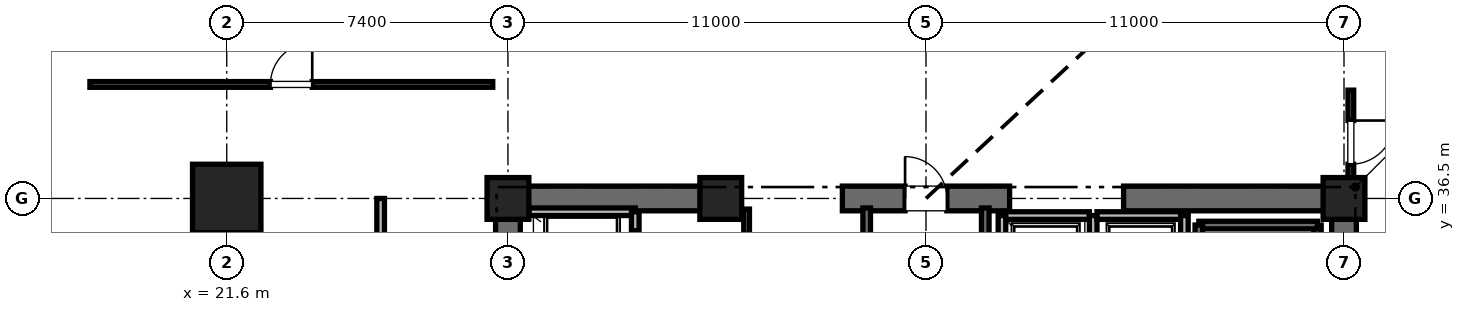
"""IFC4 building model, lengths in metres.
Left out: names, types, materials, properties, quantities, classifications, styles, units other than length and angle.
Written with IfcOpenShell. Run it as: python <this file> out.ifc"""

import sys

from ifc_helpers import new_model, si_unit, direction, frame, frame_2d, origin, origin_2d, place, context, subcontext, project, spatial, rectangle, extrude, element, fill, save


model = new_model("IFC4")
c1 = context("Model", 3, precision=1e-05, world=origin(), true_north=direction((0.0, 1.0)))
c2 = subcontext(c1, "Body", "Model", "MODEL_VIEW")
j1 = project(units=[si_unit("LENGTHUNIT", "METRE"), si_unit("PLANEANGLEUNIT", "RADIAN")], contexts=[c1])
p1 = place(None, origin())
s1 = spatial("IfcSite", under=j1, at=p1, CompositionType="ELEMENT")
p2 = place(p1, origin())
s2 = spatial("IfcBuilding", under=s1, at=p2, CompositionType="ELEMENT")
p3 = place(p2, origin())
s3 = spatial("IfcBuildingStorey", under=s2, at=p3, CompositionType="ELEMENT", Elevation=0.0)
p4 = place(p3, frame((21.6, 36.5, 0.0), z_axis=(0.0, 0.0, 1.0), x_axis=(1.0, 0.0, 0.0)))
e1 = element("IfcColumn", 1, at=p4, inside=s3, PredefinedType="COLUMN", context=c2, shape_type="SweptSolid", body=[
    extrude(rectangle(XDim=1.8, YDim=1.8, at=origin_2d()), origin(), (0.0, 0.0, 1.0), 6.0),
])
for number, where, z_axis, x_axis in (
    (2, (29.0, 36.5, 0.0), (0.0, 0.0, 1.0), (1.0, 0.0, 0.0)),
    (3, (51.0, 36.5, 0.0), (0.0, 0.0, 1.0), (1.0, 0.0, 0.0)),
    (4, (34.6, 36.5, 0.0), (0.0, 0.0, 1.0), (1.0, 0.0, 0.0)),
):
    element("IfcColumn", number, at=place(p3, frame(where, z_axis=z_axis, x_axis=x_axis)), inside=s3, PredefinedType="PILASTER", context=c2, shape_type="SweptSolid", body=[
        extrude(rectangle(XDim=1.1, YDim=1.1, at=origin_2d()), origin(), (0.0, 0.0, 1.0), 6.0),
    ])
p5 = place(p3, frame((29.0, 36.5, 0.0), z_axis=(0.0, 0.0, 1.0), x_axis=(1.0, 0.0, 0.0)))
e5 = element("IfcWall", 5, at=p5, inside=s3, PredefinedType="SHEAR", context=c2, shape_type="SweptSolid", body=[
    extrude(rectangle(XDim=5.8, YDim=0.65, at=frame_2d((2.9, 0.0))), origin(), (0.0, 0.0, 1.0), 5.72),
])
p6 = place(p3, frame((37.8, 36.5, 0.0), z_axis=(0.0, 0.0, 1.0), x_axis=(1.0, 0.0, 0.0)))
e6 = element("IfcWall", 6, at=p6, inside=s3, PredefinedType="SHEAR", context=c2, shape_type="SweptSolid", body=[
    extrude(rectangle(XDim=4.4, YDim=0.65, at=frame_2d((2.2, 0.0))), origin(), (0.0, 0.0, 1.0), 5.72),
])
p7 = place(p6, frame((1.65, 0.0, 0.0)))
e7 = element("IfcOpeningElement", 7, at=p7, cuts=e6, PredefinedType="OPENING", context=c2, shape_type="SweptSolid", body=[
    extrude(rectangle(XDim=1.1, YDim=2.15, at=frame_2d((0.55, 1.075))), frame((0.0, 0.325, 0.0), z_axis=(0.0, -1.0, 0.0), x_axis=(1.0, 0.0, 0.0)), (0.0, 0.0, 1.0), 0.65),
])
for number, where, z_axis, x_axis in (
    (8, (45.2, 36.5, 0.0), (0.0, 0.0, 1.0), (1.0, 0.0, 0.0)),
    (9, (29.0, 30.7, 0.0), (0.0, 0.0, 1.0), (0.0, 1.0, 0.0)),
):
    element("IfcWall", number, at=place(p3, frame(where, z_axis=z_axis, x_axis=x_axis)), inside=s3, PredefinedType="SHEAR", context=c2, shape_type="SweptSolid", body=[
        extrude(rectangle(XDim=5.8, YDim=0.65, at=frame_2d((2.9, 0.0))), origin(), (0.0, 0.0, 1.0), 5.72),
    ])
p8 = place(p3, frame((51.0, 27.7, 0.0), z_axis=(0.0, 0.0, 1.0), x_axis=(0.0, 1.0, 0.0)))
e10 = element("IfcWall", 10, at=p8, inside=s3, PredefinedType="SHEAR", context=c2, shape_type="SweptSolid", body=[
    extrude(rectangle(XDim=8.8, YDim=0.65, at=frame_2d((4.4, 0.0))), origin(), (0.0, 0.0, 1.0), 5.72),
])
p9 = place(p3, frame((50.3, 27.65, 0.0), z_axis=(0.0, 0.0, 1.0), x_axis=(0.0, 1.0, 0.0)))
e11 = element("IfcWall", 11, at=p9, inside=s3, PredefinedType="SOLIDWALL", context=c2, shape_type="SweptSolid", body=[
    extrude(rectangle(XDim=8.15, YDim=0.2, at=frame_2d((4.075, 0.0))), origin(), (0.0, 0.0, 1.0), 5.72),
])
p10 = place(p3, frame((47.18, 35.8, 0.0), z_axis=(0.0, 0.0, 1.0), x_axis=(1.0, 0.0, 0.0)))
e12 = element("IfcWall", 12, at=p10, inside=s3, PredefinedType="SOLIDWALL", context=c2, shape_type="SweptSolid", body=[
    extrude(rectangle(XDim=3.12, YDim=0.2, at=frame_2d((1.56, 0.0))), origin(), (0.0, 0.0, 1.0), 5.72),
])
p11 = place(p3, frame((47.18, 27.62, 0.0), z_axis=(0.0, 0.0, 1.0), x_axis=(0.0, 1.0, 0.0)))
e13 = element("IfcWall", 13, at=p11, inside=s3, PredefinedType="SOLIDWALL", context=c2, shape_type="SweptSolid", body=[
    extrude(rectangle(XDim=8.18, YDim=0.2, at=frame_2d((4.09, 0.0))), origin(), (0.0, 0.0, 1.0), 5.72),
])
p12 = place(p3, frame((38.44, 27.38, 0.0), z_axis=(0.0, 0.0, 1.0), x_axis=(0.0, 1.0, 0.0)))
e14 = element("IfcWall", 14, at=p12, inside=s3, PredefinedType="SOLIDWALL", context=c2, shape_type="SweptSolid", body=[
    extrude(rectangle(XDim=8.87, YDim=0.2, at=frame_2d((4.435, 0.0))), origin(), (0.0, 0.0, 1.0), 5.72),
])
p13 = place(p3, frame((41.56, 27.68, 0.0), z_axis=(0.0, 0.0, 1.0), x_axis=(0.0, 1.0, 0.0)))
e15 = element("IfcWall", 15, at=p13, inside=s3, PredefinedType="SOLIDWALL", context=c2, shape_type="SweptSolid", body=[
    extrude(rectangle(XDim=8.57, YDim=0.2, at=frame_2d((4.285, 0.0))), origin(), (0.0, 0.0, 1.0), 5.72),
])
p14 = place(p3, frame((32.35, 36.15, 0.0), z_axis=(0.0, 0.0, 1.0), x_axis=(-1.0, 0.0, 0.0)))
e16 = element("IfcWall", 16, at=p14, inside=s3, PredefinedType="SOLIDWALL", context=c2, shape_type="SweptSolid", body=[
    extrude(rectangle(XDim=2.8, YDim=0.2, at=frame_2d((1.4, 0.0))), origin(), (0.0, 0.0, 1.0), 4.779),
])
p15 = place(p3, frame((32.35, 34.05, 0.0), z_axis=(0.0, 0.0, 1.0), x_axis=(0.0, 1.0, 0.0)))
e17 = element("IfcWall", 17, at=p15, inside=s3, PredefinedType="SOLIDWALL", context=c2, shape_type="SweptSolid", body=[
    extrude(rectangle(XDim=2.1, YDim=0.2, at=frame_2d((1.05, 0.0))), origin(), (0.0, 0.0, 1.0), 5.72),
])
p16 = place(p15, frame((0.5, 0.0, 0.0)))
e18 = element("IfcOpeningElement", 18, at=p16, cuts=e17, PredefinedType="OPENING", context=c2, shape_type="SweptSolid", body=[
    extrude(rectangle(XDim=1.1, YDim=2.2, at=frame_2d((0.55, 1.1))), frame((0.0, 0.1, 0.0), z_axis=(0.0, -1.0, 0.0), x_axis=(1.0, 0.0, 0.0)), (0.0, 0.0, 1.0), 0.2),
])
p17 = place(p3, frame((44.3, 36.05, 0.0), z_axis=(0.0, 0.0, 1.0), x_axis=(-1.0, 0.0, 0.0)))
e19 = element("IfcWall", 19, at=p17, inside=s3, PredefinedType="SOLIDWALL", context=c2, shape_type="SweptSolid", body=[
    extrude(rectangle(XDim=2.3, YDim=0.2, at=frame_2d((1.15, 0.0))), origin(), (0.0, 0.0, 1.0), 4.5),
])
for number, where, z_axis, x_axis in (
    (20, (42.0, 36.05, 0.0), (0.0, 0.0, 1.0), (0.0, -1.0, 0.0)),
    (21, (44.4, 33.45, 0.0), (0.0, 0.0, 1.0), (0.0, 1.0, 0.0)),
):
    element("IfcWall", number, at=place(p3, frame(where, z_axis=z_axis, x_axis=x_axis)), inside=s3, PredefinedType="SOLIDWALL", context=c2, shape_type="SweptSolid", body=[
        extrude(rectangle(XDim=2.6, YDim=0.2, at=frame_2d((1.3, 0.0))), origin(), (0.0, 0.0, 1.0), 4.5),
    ])
p18 = place(p3, frame((46.8, 36.05, 0.0), z_axis=(0.0, 0.0, 1.0), x_axis=(-1.0, 0.0, 0.0)))
e22 = element("IfcWall", 22, at=p18, inside=s3, PredefinedType="SOLIDWALL", context=c2, shape_type="SweptSolid", body=[
    extrude(rectangle(XDim=2.3, YDim=0.2, at=frame_2d((1.15, 0.0))), origin(), (0.0, 0.0, 1.0), 4.5),
])
p19 = place(p3, frame((46.8, 33.45, 0.0), z_axis=(0.0, 0.0, 1.0), x_axis=(0.0, 1.0, 0.0)))
e23 = element("IfcWall", 23, at=p19, inside=s3, PredefinedType="SOLIDWALL", context=c2, shape_type="SweptSolid", body=[
    extrude(rectangle(XDim=2.6, YDim=0.2, at=frame_2d((1.3, 0.0))), origin(), (0.0, 0.0, 1.0), 5.72),
])
p20 = place(p3, frame((35.28, 33.95, 0.0), z_axis=(0.0, 0.0, 1.0), x_axis=(0.0, 1.0, 0.0)))
e24 = element("IfcWall", 24, at=p20, inside=s3, PredefinedType="PARTITIONING", context=c2, shape_type="SweptSolid", body=[
    extrude(rectangle(XDim=2.27, YDim=0.15, at=frame_2d((1.135, 0.0))), origin(), (0.0, 0.0, 1.0), 2.85),
])
p21 = place(p20, frame((0.66, 0.0, 0.0)))
e25 = element("IfcOpeningElement", 25, at=p21, cuts=e24, PredefinedType="OPENING", context=c2, shape_type="SweptSolid", body=[
    extrude(rectangle(XDim=0.95, YDim=2.15, at=frame_2d((0.475, 1.075))), frame((0.0, 0.075, 0.0), z_axis=(0.0, -1.0, 0.0), x_axis=(1.0, 0.0, 0.0)), (0.0, 0.0, 1.0), 0.15),
])
p22 = place(p3, frame((51.18, 39.35, 0.0), z_axis=(0.0, 0.0, 1.0), x_axis=(0.0, -1.0, 0.0)))
e26 = element("IfcWall", 26, at=p22, inside=s3, PredefinedType="PARTITIONING", context=c2, shape_type="SweptSolid", body=[
    extrude(rectangle(XDim=2.75, YDim=0.15, at=frame_2d((1.375, 0.0))), origin(), (0.0, 0.0, 1.0), 2.85),
])
p23 = place(p22, frame((0.8, 0.0, 0.0)))
e27 = element("IfcOpeningElement", 27, at=p23, cuts=e26, PredefinedType="OPENING", context=c2, shape_type="SweptSolid", body=[
    extrude(rectangle(XDim=1.15, YDim=2.2, at=frame_2d((0.575, 1.1))), frame((0.0, 0.075, 0.0), z_axis=(0.0, -1.0, 0.0), x_axis=(1.0, 0.0, 0.0)), (0.0, 0.0, 1.0), 0.15),
])
p24 = place(p3, frame((25.65, -1.35, 0.0), z_axis=(0.0, 0.0, 1.0), x_axis=(0.0, 1.0, 0.0)))
e28 = element("IfcWall", 28, at=p24, inside=s3, PredefinedType="PARTITIONING", context=c2, shape_type="SweptSolid", body=[
    extrude(rectangle(XDim=37.85, YDim=0.2, at=frame_2d((18.925, 0.0))), origin(), (0.0, 0.0, 1.0), 2.85),
])
p25 = place(p24, frame((17.775, 0.0, 0.0)))
e29 = element("IfcOpeningElement", 29, at=p25, cuts=e28, PredefinedType="OPENING", context=c2, shape_type="SweptSolid", body=[
    extrude(rectangle(XDim=1.15, YDim=2.2, at=frame_2d((0.575, 1.1))), frame((0.0, 0.1, 0.0), z_axis=(0.0, -1.0, 0.0), x_axis=(1.0, 0.0, 0.0)), (0.0, 0.0, 1.0), 0.2),
])
p26 = place(p3, frame((18.0, 39.5, 0.0), z_axis=(0.0, 0.0, 1.0), x_axis=(1.0, 0.0, 0.0)))
e30 = element("IfcWall", 30, at=p26, inside=s3, PredefinedType="PARTITIONING", context=c2, shape_type="SweptSolid", body=[
    extrude(rectangle(XDim=10.6, YDim=0.15, at=frame_2d((5.3, 0.0))), origin(), (0.0, 0.0, 1.0), 2.85),
])
p27 = place(p26, frame((4.75, 0.0, 0.0)))
e31 = element("IfcOpeningElement", 31, at=p27, cuts=e30, PredefinedType="OPENING", context=c2, shape_type="SweptSolid", body=[
    extrude(rectangle(XDim=1.1, YDim=2.15, at=frame_2d((0.55, 1.075))), frame((0.0, 0.075, 0.0), z_axis=(0.0, -1.0, 0.0), x_axis=(1.0, 0.0, 0.0)), (0.0, 0.0, 1.0), 0.15),
])
p28 = place(p7, origin())
e32 = element("IfcDoor", 32, at=p28, inside=s3, OperationType="SINGLE_SWING_LEFT", PredefinedType="DOOR", context=c2, shape_type="SweptSolid", body=[
    extrude(rectangle(XDim=1.1, YDim=2.15, at=frame_2d((0.55, 1.075))), frame((0.0, 0.025, 0.0), z_axis=(0.0, -1.0, 0.0), x_axis=(1.0, 0.0, 0.0)), (0.0, 0.0, 1.0), 0.05),
])
fill(e7, e32)
p29 = place(p16, origin())
e33 = element("IfcDoor", 33, at=p29, inside=s3, OperationType="SLIDING_TO_RIGHT", PredefinedType="DOOR", context=c2, shape_type="SweptSolid", body=[
    extrude(rectangle(XDim=1.1, YDim=2.2, at=frame_2d((0.55, 1.1))), frame((0.0, 0.025, 0.0), z_axis=(0.0, -1.0, 0.0), x_axis=(1.0, 0.0, 0.0)), (0.0, 0.0, 1.0), 0.05),
])
fill(e18, e33)
p30 = place(p23, origin())
e34 = element("IfcDoor", 34, at=p30, inside=s3, OperationType="SINGLE_SWING_LEFT", PredefinedType="DOOR", context=c2, shape_type="SweptSolid", body=[
    extrude(rectangle(XDim=1.15, YDim=2.2, at=frame_2d((0.575, 1.1))), frame((0.0, 0.025, 0.0), z_axis=(0.0, -1.0, 0.0), x_axis=(1.0, 0.0, 0.0)), (0.0, 0.0, 1.0), 0.05),
])
fill(e27, e34)
p31 = place(p27, origin())
e35 = element("IfcDoor", 35, at=p31, inside=s3, OperationType="SINGLE_SWING_RIGHT", PredefinedType="DOOR", context=c2, shape_type="SweptSolid", body=[
    extrude(rectangle(XDim=1.1, YDim=2.15, at=frame_2d((0.55, 1.075))), frame((0.0, 0.025, 0.0), z_axis=(0.0, -1.0, 0.0), x_axis=(1.0, 0.0, 0.0)), (0.0, 0.0, 1.0), 0.05),
])
fill(e31, e35)
save(model, sys.argv[1])
